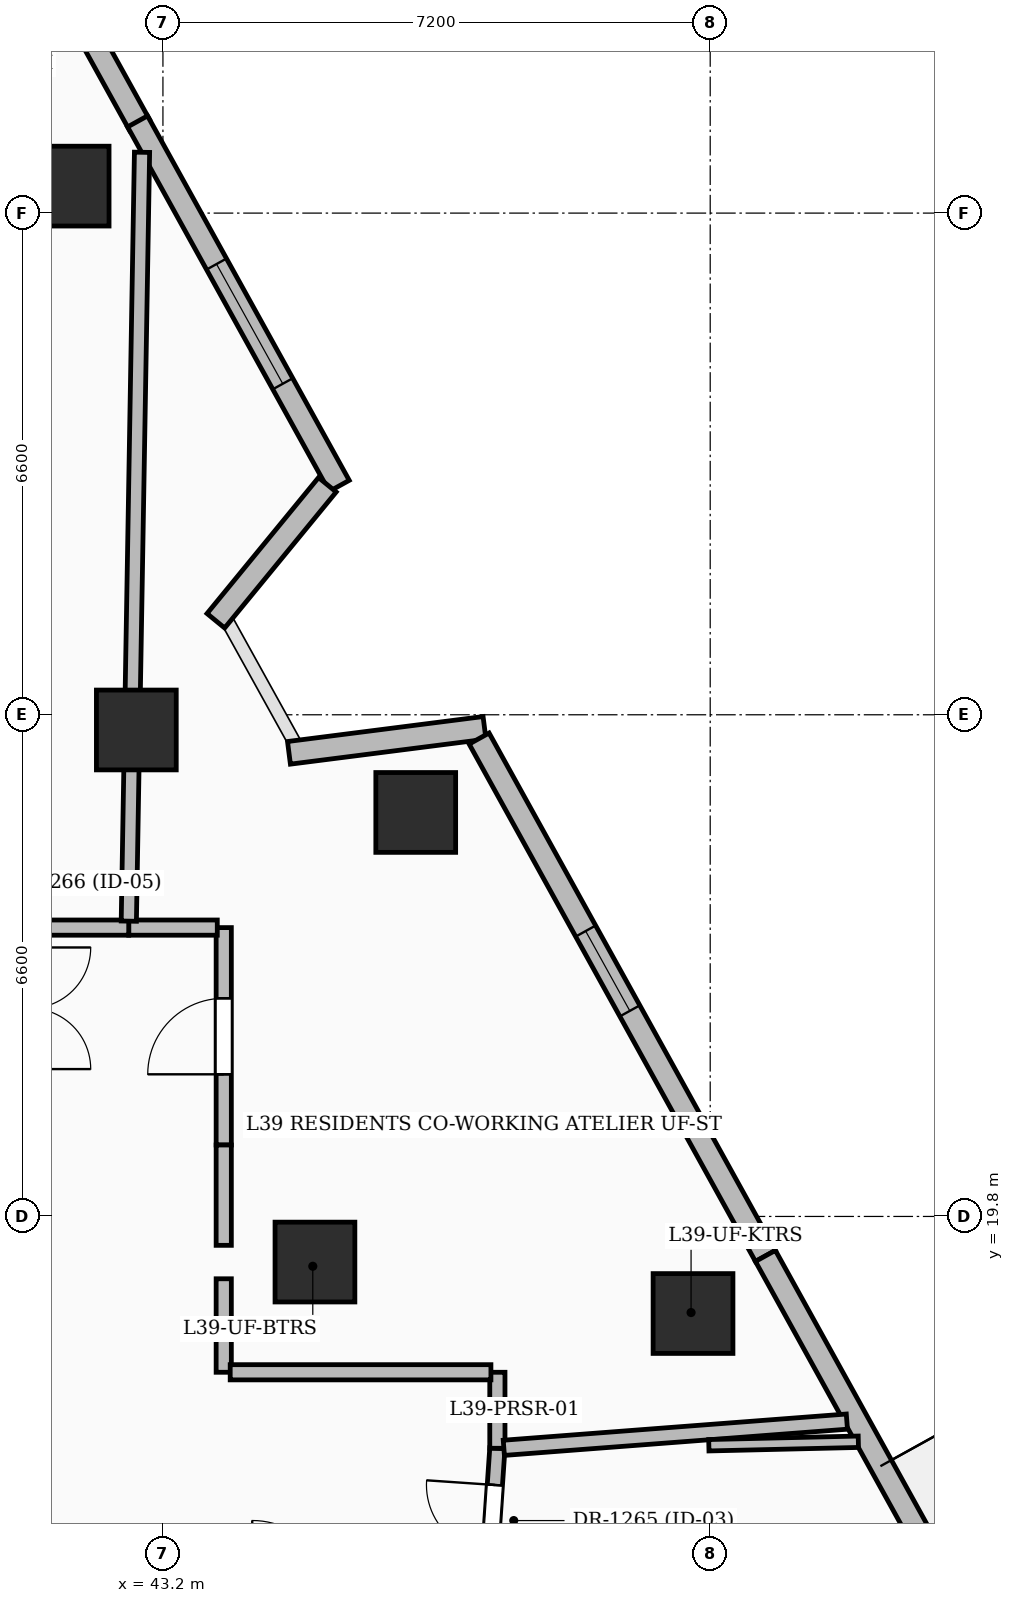
"""IFC4 building model, lengths in metres.
Left out: names, types, materials, properties, quantities, classifications, styles, units other than length and angle.
Written with IfcOpenShell. Run it as: python <this file> out.ifc"""

import sys

from ifc_helpers import new_model, si_unit, direction, frame, frame_2d, origin, origin_2d, place, context, subcontext, project, spatial, rectangle, extrude, element, fill, save


model = new_model("IFC4")
c1 = context("Model", 3, precision=1e-05, world=origin(), true_north=direction((0.0, 1.0)))
c2 = subcontext(c1, "Body", "Model", "MODEL_VIEW")
j1 = project(units=[si_unit("LENGTHUNIT", "METRE"), si_unit("PLANEANGLEUNIT", "RADIAN")], contexts=[c1])
p1 = place(None, origin())
s1 = spatial("IfcSite", under=j1, at=p1, CompositionType="ELEMENT")
p2 = place(p1, origin())
s2 = spatial("IfcBuilding", under=s1, at=p2, CompositionType="ELEMENT")
p3 = place(p2, frame((0.0, 0.0, 153.6)))
s3 = spatial("IfcBuildingStorey", under=s2, at=p3, CompositionType="ELEMENT", Elevation=153.6)
for number, where, z_axis, x_axis in (
    (1, (45.2, 19.2, 0.0), (0.0, 0.0, 1.0), (1.0, 0.0, 0.0)),
    (2, (42.85, 26.2, 0.0), (0.0, 0.0, 1.0), (1.0, 0.0, 0.0)),
    (3, (50.174, 18.523, 0.0), (0.0, 0.0, 1.0), (1.0, 0.0, 0.0)),
    (4, (46.526, 25.115, 0.0), (0.0, 0.0, 1.0), (1.0, 0.0, 0.0)),
    (5, (41.966, 33.355, 0.0), (0.0, 0.0, 1.0), (1.0, 0.0, 0.0)),
):
    element("IfcColumn", number, at=place(p3, frame(where, z_axis=z_axis, x_axis=x_axis)), inside=s3, PredefinedType="COLUMN", context=c2, shape_type="SweptSolid", body=[
        extrude(rectangle(XDim=1.05, YDim=1.05, at=origin_2d()), origin(), (0.0, 0.0, 1.0), 3.6),
    ])
p4 = place(p3, frame((40.155, 39.106, 0.0), z_axis=(0.0, 0.0, 1.0), x_axis=(0.484204903903, -0.874954633702, 0.0)))
e6 = element("IfcWall", 6, at=p4, inside=s3, PredefinedType="SOLIDWALL", context=c2, shape_type="SweptSolid", body=[
    extrude(rectangle(XDim=5.653, YDim=0.3, at=frame_2d((2.827, 0.0))), origin(), (0.0, 0.0, 1.0), 3.35),
])
p5 = place(p4, frame((1.76, 0.0, 0.55)))
e7 = element("IfcOpeningElement", 7, at=p5, cuts=e6, PredefinedType="OPENING", context=c2, shape_type="SweptSolid", body=[
    extrude(rectangle(XDim=2.1, YDim=2.4, at=frame_2d((1.05, 1.2))), frame((0.0, 0.16, 0.0), z_axis=(0.0, -1.0, 0.0), x_axis=(1.0, 0.0, 0.0)), (0.0, 0.0, 1.0), 0.32),
])
p6 = place(p3, frame((42.866, 34.206, 0.0), z_axis=(0.0, 0.0, 1.0), x_axis=(0.484193476584, -0.874960957548, 0.0)))
e8 = element("IfcWall", 8, at=p6, inside=s3, PredefinedType="SOLIDWALL", context=c2, shape_type="SweptSolid", body=[
    extrude(rectangle(XDim=5.48, YDim=0.3, at=frame_2d((2.74, 0.0))), origin(), (0.0, 0.0, 1.0), 3.35),
])
p7 = place(p6, frame((2.145, 0.0, 0.6)))
e9 = element("IfcOpeningElement", 9, at=p7, cuts=e8, PredefinedType="OPENING", context=c2, shape_type="SweptSolid", body=[
    extrude(rectangle(XDim=1.8, YDim=2.1, at=frame_2d((0.9, 1.05))), frame((0.0, 0.16, 0.0), z_axis=(0.0, -1.0, 0.0), x_axis=(1.0, 0.0, 0.0)), (0.0, 0.0, 1.0), 0.32),
])
p8 = place(p3, frame((45.363, 29.426, 0.0), z_axis=(0.0, 0.0, 1.0), x_axis=(-0.634082112051, -0.773265720937, 0.0)))
e10 = element("IfcWall", 10, at=p8, inside=s3, PredefinedType="SOLIDWALL", context=c2, shape_type="SweptSolid", body=[
    extrude(rectangle(XDim=2.314, YDim=0.3, at=frame_2d((1.157, 0.0))), origin(), (0.0, 0.0, 1.0), 2.575),
])
p9 = place(p3, frame((44.858, 25.899, 0.0), z_axis=(0.0, 0.0, 1.0), x_axis=(0.991953049751, 0.126606267974, 0.0)))
e11 = element("IfcWall", 11, at=p9, inside=s3, PredefinedType="SOLIDWALL", context=c2, shape_type="SweptSolid", body=[
    extrude(rectangle(XDim=2.594, YDim=0.3, at=frame_2d((1.297, 0.0))), origin(), (0.0, 0.0, 1.0), 2.575),
])
p10 = place(p3, frame((47.36, 26.087, 0.0), z_axis=(0.0, 0.0, 1.0), x_axis=(0.484182040501, -0.874967286049, 0.0)))
e12 = element("IfcWall", 12, at=p10, inside=s3, PredefinedType="SOLIDWALL", context=c2, shape_type="SweptSolid", body=[
    extrude(rectangle(XDim=7.779, YDim=0.3, at=frame_2d((3.89, 0.0))), origin(), (0.0, 0.0, 1.0), 3.35),
])
p11 = place(p10, frame((2.895, 0.0, 0.8)))
e13 = element("IfcOpeningElement", 13, at=p11, cuts=e12, PredefinedType="OPENING", context=c2, shape_type="SweptSolid", body=[
    extrude(rectangle(XDim=1.2, YDim=1.8, at=frame_2d((0.6, 0.9))), frame((0.0, 0.16, 0.0), z_axis=(0.0, -1.0, 0.0), x_axis=(1.0, 0.0, 0.0)), (0.0, 0.0, 1.0), 0.32),
])
p12 = place(p3, frame((51.126, 19.281, 0.0), z_axis=(0.0, 0.0, 1.0), x_axis=(0.484181305153, -0.87496769297, 0.0)))
e14 = element("IfcWall", 14, at=p12, inside=s3, PredefinedType="SOLIDWALL", context=c2, shape_type="SweptSolid", body=[
    extrude(rectangle(XDim=8.059, YDim=0.3, at=frame_2d((4.03, 0.0))), origin(), (0.0, 0.0, 1.0), 3.35),
])
p13 = place(p12, frame((5.335, 0.0, 0.0)))
e15 = element("IfcOpeningElement", 15, at=p13, cuts=e14, PredefinedType="OPENING", context=c2, shape_type="SweptSolid", body=[
    extrude(rectangle(XDim=1.0, YDim=2.2, at=frame_2d((0.5, 1.1))), frame((0.0, 0.16, 0.0), z_axis=(0.0, -1.0, 0.0), x_axis=(1.0, 0.0, 0.0)), (0.0, 0.0, 1.0), 0.32),
])
p14 = place(p3, frame((47.425, 14.2, 0.0), z_axis=(0.0, 0.0, 1.0), x_axis=(0.068484119878, 0.997652206595, 0.0)))
e16 = element("IfcWall", 16, at=p14, inside=s3, PredefinedType="PARTITIONING", context=c2, shape_type="SweptSolid", body=[
    extrude(rectangle(XDim=2.556, YDim=0.2, at=frame_2d((1.278, 0.0))), origin(), (0.0, 0.0, 1.0), 2.393),
])
p15 = place(p14, frame((1.172, 0.0, 0.0)))
e17 = element("IfcOpeningElement", 17, at=p15, cuts=e16, PredefinedType="OPENING", context=c2, shape_type="SweptSolid", body=[
    extrude(rectangle(XDim=0.9, YDim=2.1, at=frame_2d((0.45, 1.05))), frame((0.0, 0.11, 0.0), z_axis=(0.0, -1.0, 0.0), x_axis=(1.0, 0.0, 0.0)), (0.0, 0.0, 1.0), 0.22),
])
p16 = place(p3, frame((44.0, 20.74, 0.0), z_axis=(0.0, 0.0, 1.0), x_axis=(0.0, 1.0, 0.0)))
e18 = element("IfcWall", 18, at=p16, inside=s3, PredefinedType="PARTITIONING", context=c2, shape_type="SweptSolid", body=[
    extrude(rectangle(XDim=2.86, YDim=0.2, at=frame_2d((1.43, 0.0))), origin(), (0.0, 0.0, 1.0), 2.436),
])
p17 = place(p16, frame((0.93, 0.0, 0.0)))
e19 = element("IfcOpeningElement", 19, at=p17, cuts=e18, PredefinedType="OPENING", context=c2, shape_type="SweptSolid", body=[
    extrude(rectangle(XDim=1.0, YDim=2.2, at=frame_2d((0.5, 1.1))), frame((0.0, 0.11, 0.0), z_axis=(0.0, -1.0, 0.0), x_axis=(1.0, 0.0, 0.0)), (0.0, 0.0, 1.0), 0.22),
])
p18 = place(p3, frame((43.915, 23.6, 0.0), z_axis=(0.0, 0.0, 1.0), x_axis=(-1.0, 0.0, 0.0)))
e20 = element("IfcWall", 20, at=p18, inside=s3, PredefinedType="PARTITIONING", context=c2, shape_type="SweptSolid", body=[
    extrude(rectangle(XDim=1.165, YDim=0.2, at=frame_2d((0.583, 0.0))), origin(), (0.0, 0.0, 1.0), 2.436),
])
p19 = place(p3, frame((47.6, 16.75, 0.0), z_axis=(0.0, 0.0, 1.0), x_axis=(0.0, 1.0, 0.0)))
e21 = element("IfcWall", 21, at=p19, inside=s3, PredefinedType="PARTITIONING", context=c2, shape_type="SweptSolid", body=[
    extrude(rectangle(XDim=1.0, YDim=0.2, at=frame_2d((0.5, 0.0))), origin(), (0.0, 0.0, 1.0), 2.911),
])
p20 = place(p3, frame((44.0, 17.75, 0.0), z_axis=(0.0, 0.0, 1.0), x_axis=(0.0, 1.0, 0.0)))
e22 = element("IfcWall", 22, at=p20, inside=s3, PredefinedType="PARTITIONING", context=c2, shape_type="SweptSolid", body=[
    extrude(rectangle(XDim=1.23, YDim=0.2, at=frame_2d((0.615, 0.0))), origin(), (0.0, 0.0, 1.0), 3.35),
])
p21 = place(p3, frame((42.75, 23.6, 0.0), z_axis=(0.0, 0.0, 1.0), x_axis=(-1.0, 0.0, 0.0)))
e23 = element("IfcWall", 23, at=p21, inside=s3, PredefinedType="PARTITIONING", context=c2, shape_type="SweptSolid", body=[
    extrude(rectangle(XDim=1.3, YDim=0.2, at=frame_2d((0.65, 0.0))), origin(), (0.0, 0.0, 1.0), 3.35),
])
p22 = place(p3, frame((52.198, 17.101, 0.0), z_axis=(0.0, 0.0, 1.0), x_axis=(-0.997091490512, -0.076213906529, 0.0)))
e24 = element("IfcWall", 24, at=p22, inside=s3, PredefinedType="PARTITIONING", context=c2, shape_type="SweptSolid", body=[
    extrude(rectangle(XDim=4.526, YDim=0.2, at=frame_2d((2.263, 0.0))), origin(), (0.0, 0.0, 1.0), 2.393),
])
p23 = place(p3, frame((42.925, 33.8, 0.0), z_axis=(0.0, 0.0, 1.0), x_axis=(-0.017206788201, -0.999851952261, 0.0)))
e25 = element("IfcWall", 25, at=p23, inside=s3, PredefinedType="PARTITIONING", context=c2, shape_type="SweptSolid", body=[
    extrude(rectangle(XDim=10.116, YDim=0.2, at=frame_2d((5.058, 0.0))), origin(), (0.0, 0.0, 1.0), 2.393),
])
p24 = place(p3, frame((47.515, 17.75, 0.0), z_axis=(0.0, 0.0, 1.0), x_axis=(-1.0, 0.0, 0.0)))
e26 = element("IfcWall", 26, at=p24, inside=s3, PredefinedType="PARTITIONING", context=c2, shape_type="SweptSolid", body=[
    extrude(rectangle(XDim=3.43, YDim=0.2, at=frame_2d((1.715, 0.0))), origin(), (0.0, 0.0, 1.0), 2.436),
])
p25 = place(p3, frame((44.0, 19.42, 0.0), z_axis=(0.0, 0.0, 1.0), x_axis=(0.0, 1.0, 0.0)))
e27 = element("IfcWall", 27, at=p25, inside=s3, PredefinedType="PARTITIONING", context=c2, shape_type="SweptSolid", body=[
    extrude(rectangle(XDim=1.32, YDim=0.2, at=frame_2d((0.66, 0.0))), origin(), (0.0, 0.0, 1.0), 3.35),
])
p26 = place(p3, frame((52.349, 16.836, 0.0), z_axis=(0.0, 0.0, 1.0), x_axis=(-0.999727879239, -0.023327397455, 0.0)))
e28 = element("IfcWall", 28, at=p26, inside=s3, PredefinedType="PARTITIONING", context=c2, shape_type="SweptSolid", body=[
    extrude(rectangle(XDim=1.968, YDim=0.15, at=frame_2d((0.984, 0.0))), origin(), (0.0, 0.0, 1.0), 2.393),
])
p27 = place(p7, origin())
e29 = element("IfcWindow", 29, at=p27, inside=s3, PartitioningType="SINGLE_PANEL", PredefinedType="WINDOW", context=c2, shape_type="SweptSolid", body=[
    extrude(rectangle(XDim=1.8, YDim=2.1, at=frame_2d((0.9, 1.05))), frame((0.0, 0.03, 0.0), z_axis=(0.0, -1.0, 0.0), x_axis=(1.0, 0.0, 0.0)), (0.0, 0.0, 1.0), 0.06),
])
fill(e9, e29)
p28 = place(p11, origin())
e30 = element("IfcWindow", 30, at=p28, inside=s3, PartitioningType="SINGLE_PANEL", PredefinedType="WINDOW", context=c2, shape_type="SweptSolid", body=[
    extrude(rectangle(XDim=1.2, YDim=1.8, at=frame_2d((0.6, 0.9))), frame((0.0, 0.03, 0.0), z_axis=(0.0, -1.0, 0.0), x_axis=(1.0, 0.0, 0.0)), (0.0, 0.0, 1.0), 0.06),
])
fill(e13, e30)
p29 = place(p15, origin())
e31 = element("IfcDoor", 31, at=p29, inside=s3, OperationType="SINGLE_SWING_RIGHT", PredefinedType="DOOR", context=c2, shape_type="SweptSolid", body=[
    extrude(rectangle(XDim=0.9, YDim=2.1, at=frame_2d((0.45, 1.05))), frame((0.0, 0.025, 0.0), z_axis=(0.0, -1.0, 0.0), x_axis=(1.0, 0.0, 0.0)), (0.0, 0.0, 1.0), 0.05),
])
fill(e17, e31)
p30 = place(p17, origin())
e32 = element("IfcDoor", 32, at=p30, inside=s3, OperationType="SINGLE_SWING_LEFT", PredefinedType="DOOR", context=c2, shape_type="SweptSolid", body=[
    extrude(rectangle(XDim=1.0, YDim=2.2, at=frame_2d((0.5, 1.1))), frame((0.0, 0.025, 0.0), z_axis=(0.0, -1.0, 0.0), x_axis=(1.0, 0.0, 0.0)), (0.0, 0.0, 1.0), 0.05),
])
fill(e19, e32)
save(model, sys.argv[1])
